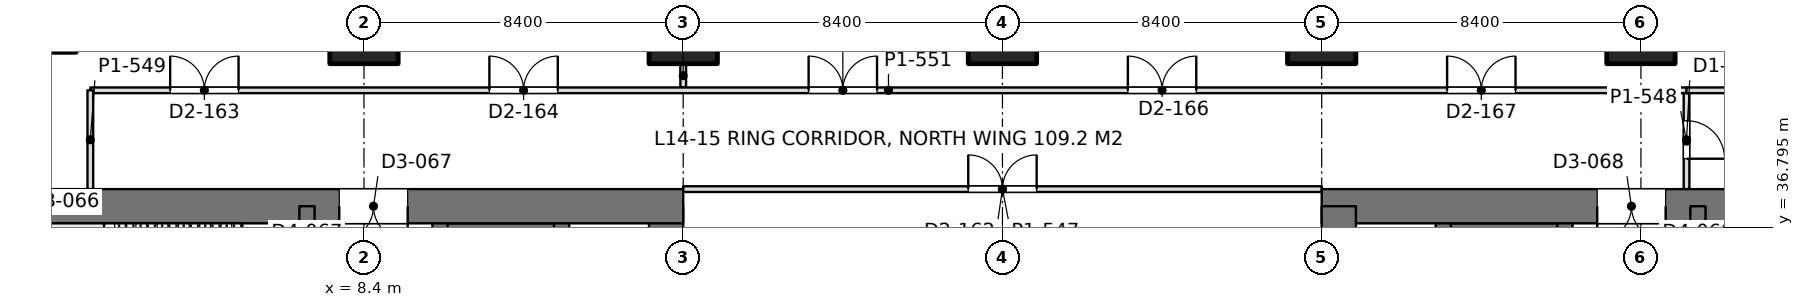
"""IFC4 building model, lengths in metres.
Left out: names, types, materials, properties, quantities, classifications, styles, units other than length and angle.
Written with IfcOpenShell. Run it as: python <this file> out.ifc"""

import sys

from ifc_helpers import new_model, si_unit, direction, frame, frame_2d, origin, origin_2d, place, context, subcontext, project, spatial, rectangle, extrude, element, fill, save


model = new_model("IFC4")
c1 = context("Model", 3, precision=1e-05, world=origin(), true_north=direction((0.0, 1.0)))
c2 = subcontext(c1, "Body", "Model", "MODEL_VIEW")
j1 = project(units=[si_unit("LENGTHUNIT", "METRE"), si_unit("PLANEANGLEUNIT", "RADIAN")], contexts=[c1])
p1 = place(None, origin())
s1 = spatial("IfcSite", under=j1, at=p1, CompositionType="ELEMENT")
p2 = place(p1, origin())
s2 = spatial("IfcBuilding", under=s1, at=p2, CompositionType="ELEMENT")
p3 = place(p2, frame((0.0, 0.0, 63.9)))
s3 = spatial("IfcBuildingStorey", under=s2, at=p3, CompositionType="ELEMENT", Elevation=63.9)
for number, where, z_axis, x_axis in (
    (1, (8.4, 42.0, 0.0), (0.0, 0.0, 1.0), (1.0, 0.0, 0.0)),
    (2, (16.8, 42.0, 0.0), (0.0, 0.0, 1.0), (1.0, 0.0, 0.0)),
    (3, (25.2, 42.0, 0.0), (0.0, 0.0, 1.0), (1.0, 0.0, 0.0)),
    (4, (33.6, 42.0, 0.0), (0.0, 0.0, 1.0), (1.0, 0.0, 0.0)),
    (5, (42.0, 42.0, 0.0), (0.0, 0.0, 1.0), (1.0, 0.0, 0.0)),
):
    element("IfcColumn", number, at=place(p3, frame(where, z_axis=z_axis, x_axis=x_axis)), inside=s3, PredefinedType="COLUMN", context=c2, shape_type="SweptSolid", body=[
        extrude(rectangle(XDim=1.8, YDim=1.8, at=origin_2d()), origin(), (0.0, 0.0, 1.0), 4.5),
    ])
p4 = place(p3, frame((-1.2, 37.35, 0.0), z_axis=(0.0, 0.0, 1.0), x_axis=(1.0, 0.0, 0.0)))
e6 = element("IfcWall", 6, at=p4, inside=s3, PredefinedType="SHEAR", context=c2, shape_type="SweptSolid", body=[
    extrude(rectangle(XDim=18.0, YDim=0.9, at=frame_2d((9.0, 0.0))), origin(), (0.0, 0.0, 1.0), 4.5),
])
p5 = place(p4, frame((8.95, 0.0, 0.0)))
e7 = element("IfcOpeningElement", 7, at=p5, cuts=e6, PredefinedType="OPENING", context=c2, shape_type="SweptSolid", body=[
    extrude(rectangle(XDim=1.8, YDim=2.4, at=frame_2d((0.9, 1.2))), frame((0.0, 0.46, 0.0), z_axis=(0.0, -1.0, 0.0), x_axis=(1.0, 0.0, 0.0)), (0.0, 0.0, 1.0), 0.92),
])
p6 = place(p3, frame((16.35, 13.05, 0.0), z_axis=(0.0, 0.0, 1.0), x_axis=(0.0, 1.0, 0.0)))
e8 = element("IfcWall", 8, at=p6, inside=s3, PredefinedType="SHEAR", context=c2, shape_type="SweptSolid", body=[
    extrude(rectangle(XDim=24.3, YDim=0.9, at=frame_2d((12.15, 0.0))), origin(), (0.0, 0.0, 1.0), 4.5),
])
p7 = place(p3, frame((6.9, 13.05, 0.0), z_axis=(0.0, 0.0, 1.0), x_axis=(0.0, 1.0, 0.0)))
e9 = element("IfcWall", 9, at=p7, inside=s3, PredefinedType="SHEAR", context=c2, shape_type="SweptSolid", body=[
    extrude(rectangle(XDim=24.3, YDim=0.4, at=frame_2d((12.15, 0.0))), origin(), (0.0, 0.0, 1.0), 4.5),
])
p8 = place(p7, frame((1.3, 0.0, 0.0)))
e10 = element("IfcOpeningElement", 10, at=p8, cuts=e9, PredefinedType="OPENING", context=c2, shape_type="SweptSolid", body=[
    extrude(rectangle(XDim=1.0, YDim=2.2, at=frame_2d((0.5, 1.1))), frame((0.0, 0.21, 0.0), z_axis=(0.0, -1.0, 0.0), x_axis=(1.0, 0.0, 0.0)), (0.0, 0.0, 1.0), 0.42),
])
p9 = place(p7, frame((22.0, 0.0, 0.0)))
e11 = element("IfcOpeningElement", 11, at=p9, cuts=e9, PredefinedType="OPENING", context=c2, shape_type="SweptSolid", body=[
    extrude(rectangle(XDim=1.0, YDim=2.2, at=frame_2d((0.5, 1.1))), frame((0.0, 0.21, 0.0), z_axis=(0.0, -1.0, 0.0), x_axis=(1.0, 0.0, 0.0)), (0.0, 0.0, 1.0), 0.42),
])
p10 = place(p7, frame((5.55, 0.0, 0.0)))
e12 = element("IfcOpeningElement", 12, at=p10, cuts=e9, PredefinedType="OPENING", context=c2, shape_type="SweptSolid", body=[
    extrude(rectangle(XDim=1.0, YDim=2.2, at=frame_2d((0.5, 1.1))), frame((0.0, 0.21, 0.0), z_axis=(0.0, -1.0, 0.0), x_axis=(1.0, 0.0, 0.0)), (0.0, 0.0, 1.0), 0.42),
])
p11 = place(p7, frame((9.55, 0.0, 0.0)))
e13 = element("IfcOpeningElement", 13, at=p11, cuts=e9, PredefinedType="OPENING", context=c2, shape_type="SweptSolid", body=[
    extrude(rectangle(XDim=1.0, YDim=2.2, at=frame_2d((0.5, 1.1))), frame((0.0, 0.21, 0.0), z_axis=(0.0, -1.0, 0.0), x_axis=(1.0, 0.0, 0.0)), (0.0, 0.0, 1.0), 0.42),
])
p12 = place(p7, frame((12.8, 0.0, 0.0)))
e14 = element("IfcOpeningElement", 14, at=p12, cuts=e9, PredefinedType="OPENING", context=c2, shape_type="SweptSolid", body=[
    extrude(rectangle(XDim=1.1, YDim=2.2, at=frame_2d((0.55, 1.1))), frame((0.0, 0.21, 0.0), z_axis=(0.0, -1.0, 0.0), x_axis=(1.0, 0.0, 0.0)), (0.0, 0.0, 1.0), 0.42),
])
p13 = place(p7, frame((15.538, 0.0, 0.0)))
e15 = element("IfcOpeningElement", 15, at=p13, cuts=e9, PredefinedType="OPENING", context=c2, shape_type="SweptSolid", body=[
    extrude(rectangle(XDim=1.1, YDim=2.2, at=frame_2d((0.55, 1.1))), frame((0.0, 0.21, 0.0), z_axis=(0.0, -1.0, 0.0), x_axis=(1.0, 0.0, 0.0)), (0.0, 0.0, 1.0), 0.42),
])
p14 = place(p7, frame((18.262, 0.0, 0.0)))
e16 = element("IfcOpeningElement", 16, at=p14, cuts=e9, PredefinedType="OPENING", context=c2, shape_type="SweptSolid", body=[
    extrude(rectangle(XDim=1.1, YDim=2.2, at=frame_2d((0.55, 1.1))), frame((0.0, 0.21, 0.0), z_axis=(0.0, -1.0, 0.0), x_axis=(1.0, 0.0, 0.0)), (0.0, 0.0, 1.0), 0.42),
])
p15 = place(p3, frame((10.4, 13.05, 0.0), z_axis=(0.0, 0.0, 1.0), x_axis=(0.0, 1.0, 0.0)))
e17 = element("IfcWall", 17, at=p15, inside=s3, PredefinedType="SHEAR", context=c2, shape_type="SweptSolid", body=[
    extrude(rectangle(XDim=24.3, YDim=0.4, at=frame_2d((12.15, 0.0))), origin(), (0.0, 0.0, 1.0), 4.5),
])
p16 = place(p15, frame((1.5, 0.0, 0.0)))
e18 = element("IfcOpeningElement", 18, at=p16, cuts=e17, PredefinedType="OPENING", context=c2, shape_type="SweptSolid", body=[
    extrude(rectangle(XDim=1.1, YDim=2.2, at=frame_2d((0.55, 1.1))), frame((0.0, 0.21, 0.0), z_axis=(0.0, -1.0, 0.0), x_axis=(1.0, 0.0, 0.0)), (0.0, 0.0, 1.0), 0.42),
])
p17 = place(p15, frame((4.35, 0.0, 0.0)))
e19 = element("IfcOpeningElement", 19, at=p17, cuts=e17, PredefinedType="OPENING", context=c2, shape_type="SweptSolid", body=[
    extrude(rectangle(XDim=1.1, YDim=2.2, at=frame_2d((0.55, 1.1))), frame((0.0, 0.21, 0.0), z_axis=(0.0, -1.0, 0.0), x_axis=(1.0, 0.0, 0.0)), (0.0, 0.0, 1.0), 0.42),
])
p18 = place(p15, frame((7.2, 0.0, 0.0)))
e20 = element("IfcOpeningElement", 20, at=p18, cuts=e17, PredefinedType="OPENING", context=c2, shape_type="SweptSolid", body=[
    extrude(rectangle(XDim=1.1, YDim=2.2, at=frame_2d((0.55, 1.1))), frame((0.0, 0.21, 0.0), z_axis=(0.0, -1.0, 0.0), x_axis=(1.0, 0.0, 0.0)), (0.0, 0.0, 1.0), 0.42),
])
p19 = place(p15, frame((21.45, 0.0, 0.0)))
e21 = element("IfcOpeningElement", 21, at=p19, cuts=e17, PredefinedType="OPENING", context=c2, shape_type="SweptSolid", body=[
    extrude(rectangle(XDim=1.1, YDim=2.2, at=frame_2d((0.55, 1.1))), frame((0.0, 0.21, 0.0), z_axis=(0.0, -1.0, 0.0), x_axis=(1.0, 0.0, 0.0)), (0.0, 0.0, 1.0), 0.42),
])
p20 = place(p3, frame((13.6, 13.05, 0.0), z_axis=(0.0, 0.0, 1.0), x_axis=(0.0, 1.0, 0.0)))
e22 = element("IfcWall", 22, at=p20, inside=s3, PredefinedType="SHEAR", context=c2, shape_type="SweptSolid", body=[
    extrude(rectangle(XDim=24.3, YDim=0.4, at=frame_2d((12.15, 0.0))), origin(), (0.0, 0.0, 1.0), 4.5),
])
p21 = place(p3, frame((10.4, 36.625, 0.0), z_axis=(0.0, 0.0, 1.0), x_axis=(1.0, 0.0, 0.0)))
e23 = element("IfcWall", 23, at=p21, inside=s3, PredefinedType="SHEAR", context=c2, shape_type="SweptSolid", body=[
    extrude(rectangle(XDim=3.2, YDim=0.55, at=frame_2d((1.6, 0.0))), origin(), (0.0, 0.0, 1.0), 4.5),
])
p22 = place(p3, frame((33.6, 37.35, 0.0), z_axis=(0.0, 0.0, 1.0), x_axis=(1.0, 0.0, 0.0)))
e24 = element("IfcWall", 24, at=p22, inside=s3, PredefinedType="SHEAR", context=c2, shape_type="SweptSolid", body=[
    extrude(rectangle(XDim=18.0, YDim=0.9, at=frame_2d((9.0, 0.0))), origin(), (0.0, 0.0, 1.0), 4.5),
])
p23 = place(p22, frame((7.25, 0.0, 0.0)))
e25 = element("IfcOpeningElement", 25, at=p23, cuts=e24, PredefinedType="OPENING", context=c2, shape_type="SweptSolid", body=[
    extrude(rectangle(XDim=1.8, YDim=2.4, at=frame_2d((0.9, 1.2))), frame((0.0, 0.46, 0.0), z_axis=(0.0, -1.0, 0.0), x_axis=(1.0, 0.0, 0.0)), (0.0, 0.0, 1.0), 0.92),
])
p24 = place(p3, frame((34.05, 13.05, 0.0), z_axis=(0.0, 0.0, 1.0), x_axis=(0.0, 1.0, 0.0)))
e26 = element("IfcWall", 26, at=p24, inside=s3, PredefinedType="SHEAR", context=c2, shape_type="SweptSolid", body=[
    extrude(rectangle(XDim=24.3, YDim=0.9, at=frame_2d((12.15, 0.0))), origin(), (0.0, 0.0, 1.0), 4.5),
])
p25 = place(p3, frame((43.5, 13.05, 0.0), z_axis=(0.0, 0.0, 1.0), x_axis=(0.0, 1.0, 0.0)))
e27 = element("IfcWall", 27, at=p25, inside=s3, PredefinedType="SHEAR", context=c2, shape_type="SweptSolid", body=[
    extrude(rectangle(XDim=24.3, YDim=0.4, at=frame_2d((12.15, 0.0))), origin(), (0.0, 0.0, 1.0), 4.5),
])
p26 = place(p25, frame((1.3, 0.0, 0.0)))
e28 = element("IfcOpeningElement", 28, at=p26, cuts=e27, PredefinedType="OPENING", context=c2, shape_type="SweptSolid", body=[
    extrude(rectangle(XDim=1.0, YDim=2.2, at=frame_2d((0.5, 1.1))), frame((0.0, 0.21, 0.0), z_axis=(0.0, -1.0, 0.0), x_axis=(1.0, 0.0, 0.0)), (0.0, 0.0, 1.0), 0.42),
])
p27 = place(p25, frame((22.0, 0.0, 0.0)))
e29 = element("IfcOpeningElement", 29, at=p27, cuts=e27, PredefinedType="OPENING", context=c2, shape_type="SweptSolid", body=[
    extrude(rectangle(XDim=1.0, YDim=2.2, at=frame_2d((0.5, 1.1))), frame((0.0, 0.21, 0.0), z_axis=(0.0, -1.0, 0.0), x_axis=(1.0, 0.0, 0.0)), (0.0, 0.0, 1.0), 0.42),
])
p28 = place(p25, frame((5.55, 0.0, 0.0)))
e30 = element("IfcOpeningElement", 30, at=p28, cuts=e27, PredefinedType="OPENING", context=c2, shape_type="SweptSolid", body=[
    extrude(rectangle(XDim=1.0, YDim=2.2, at=frame_2d((0.5, 1.1))), frame((0.0, 0.21, 0.0), z_axis=(0.0, -1.0, 0.0), x_axis=(1.0, 0.0, 0.0)), (0.0, 0.0, 1.0), 0.42),
])
p29 = place(p25, frame((9.55, 0.0, 0.0)))
e31 = element("IfcOpeningElement", 31, at=p29, cuts=e27, PredefinedType="OPENING", context=c2, shape_type="SweptSolid", body=[
    extrude(rectangle(XDim=1.0, YDim=2.2, at=frame_2d((0.5, 1.1))), frame((0.0, 0.21, 0.0), z_axis=(0.0, -1.0, 0.0), x_axis=(1.0, 0.0, 0.0)), (0.0, 0.0, 1.0), 0.42),
])
p30 = place(p25, frame((12.8, 0.0, 0.0)))
e32 = element("IfcOpeningElement", 32, at=p30, cuts=e27, PredefinedType="OPENING", context=c2, shape_type="SweptSolid", body=[
    extrude(rectangle(XDim=1.1, YDim=2.2, at=frame_2d((0.55, 1.1))), frame((0.0, 0.21, 0.0), z_axis=(0.0, -1.0, 0.0), x_axis=(1.0, 0.0, 0.0)), (0.0, 0.0, 1.0), 0.42),
])
p31 = place(p25, frame((15.538, 0.0, 0.0)))
e33 = element("IfcOpeningElement", 33, at=p31, cuts=e27, PredefinedType="OPENING", context=c2, shape_type="SweptSolid", body=[
    extrude(rectangle(XDim=1.1, YDim=2.2, at=frame_2d((0.55, 1.1))), frame((0.0, 0.21, 0.0), z_axis=(0.0, -1.0, 0.0), x_axis=(1.0, 0.0, 0.0)), (0.0, 0.0, 1.0), 0.42),
])
p32 = place(p25, frame((18.262, 0.0, 0.0)))
e34 = element("IfcOpeningElement", 34, at=p32, cuts=e27, PredefinedType="OPENING", context=c2, shape_type="SweptSolid", body=[
    extrude(rectangle(XDim=1.1, YDim=2.2, at=frame_2d((0.55, 1.1))), frame((0.0, 0.21, 0.0), z_axis=(0.0, -1.0, 0.0), x_axis=(1.0, 0.0, 0.0)), (0.0, 0.0, 1.0), 0.42),
])
p33 = place(p3, frame((40.0, 13.05, 0.0), z_axis=(0.0, 0.0, 1.0), x_axis=(0.0, 1.0, 0.0)))
e35 = element("IfcWall", 35, at=p33, inside=s3, PredefinedType="SHEAR", context=c2, shape_type="SweptSolid", body=[
    extrude(rectangle(XDim=24.3, YDim=0.4, at=frame_2d((12.15, 0.0))), origin(), (0.0, 0.0, 1.0), 4.5),
])
p34 = place(p33, frame((1.5, 0.0, 0.0)))
e36 = element("IfcOpeningElement", 36, at=p34, cuts=e35, PredefinedType="OPENING", context=c2, shape_type="SweptSolid", body=[
    extrude(rectangle(XDim=1.1, YDim=2.2, at=frame_2d((0.55, 1.1))), frame((0.0, 0.21, 0.0), z_axis=(0.0, -1.0, 0.0), x_axis=(1.0, 0.0, 0.0)), (0.0, 0.0, 1.0), 0.42),
])
p35 = place(p33, frame((4.35, 0.0, 0.0)))
e37 = element("IfcOpeningElement", 37, at=p35, cuts=e35, PredefinedType="OPENING", context=c2, shape_type="SweptSolid", body=[
    extrude(rectangle(XDim=1.1, YDim=2.2, at=frame_2d((0.55, 1.1))), frame((0.0, 0.21, 0.0), z_axis=(0.0, -1.0, 0.0), x_axis=(1.0, 0.0, 0.0)), (0.0, 0.0, 1.0), 0.42),
])
p36 = place(p33, frame((7.2, 0.0, 0.0)))
e38 = element("IfcOpeningElement", 38, at=p36, cuts=e35, PredefinedType="OPENING", context=c2, shape_type="SweptSolid", body=[
    extrude(rectangle(XDim=1.1, YDim=2.2, at=frame_2d((0.55, 1.1))), frame((0.0, 0.21, 0.0), z_axis=(0.0, -1.0, 0.0), x_axis=(1.0, 0.0, 0.0)), (0.0, 0.0, 1.0), 0.42),
])
p37 = place(p33, frame((21.45, 0.0, 0.0)))
e39 = element("IfcOpeningElement", 39, at=p37, cuts=e35, PredefinedType="OPENING", context=c2, shape_type="SweptSolid", body=[
    extrude(rectangle(XDim=1.1, YDim=2.2, at=frame_2d((0.55, 1.1))), frame((0.0, 0.21, 0.0), z_axis=(0.0, -1.0, 0.0), x_axis=(1.0, 0.0, 0.0)), (0.0, 0.0, 1.0), 0.42),
])
p38 = place(p3, frame((36.8, 13.05, 0.0), z_axis=(0.0, 0.0, 1.0), x_axis=(0.0, 1.0, 0.0)))
e40 = element("IfcWall", 40, at=p38, inside=s3, PredefinedType="SHEAR", context=c2, shape_type="SweptSolid", body=[
    extrude(rectangle(XDim=24.3, YDim=0.4, at=frame_2d((12.15, 0.0))), origin(), (0.0, 0.0, 1.0), 4.5),
])
p39 = place(p3, frame((40.0, 36.625, 0.0), z_axis=(0.0, 0.0, 1.0), x_axis=(-1.0, 0.0, 0.0)))
e41 = element("IfcWall", 41, at=p39, inside=s3, PredefinedType="SHEAR", context=c2, shape_type="SweptSolid", body=[
    extrude(rectangle(XDim=3.2, YDim=0.55, at=frame_2d((1.6, 0.0))), origin(), (0.0, 0.0, 1.0), 4.5),
])
p40 = place(p3, frame((16.8, 40.474, 0.0), z_axis=(0.0, 0.0, 1.0), x_axis=(0.0, 1.0, 0.0)))
e42 = element("IfcWall", 42, at=p40, inside=s3, PredefinedType="PARTITIONING", context=c2, shape_type="SweptSolid", body=[
    extrude(rectangle(XDim=0.627, YDim=0.15, at=frame_2d((0.313, 0.0))), origin(), (0.0, 0.0, 1.0), 3.98),
])
p41 = place(p3, frame((1.2, 40.4, 0.0), z_axis=(0.0, 0.0, 1.0), x_axis=(1.0, 0.0, 0.0)))
e43 = element("IfcWall", 43, at=p41, inside=s3, PredefinedType="PARTITIONING", context=c2, shape_type="SweptSolid", body=[
    extrude(rectangle(XDim=42.002, YDim=0.15, at=frame_2d((21.001, 0.0))), origin(), (0.0, 0.0, 1.0), 3.74),
])
p42 = place(p41, frame((2.1, 0.0, 0.0)))
e44 = element("IfcOpeningElement", 44, at=p42, cuts=e43, PredefinedType="OPENING", context=c2, shape_type="SweptSolid", body=[
    extrude(rectangle(XDim=1.8, YDim=2.2, at=frame_2d((0.9, 1.1))), frame((0.0, 0.085, 0.0), z_axis=(0.0, -1.0, 0.0), x_axis=(1.0, 0.0, 0.0)), (0.0, 0.0, 1.0), 0.17),
])
p43 = place(p41, frame((10.5, 0.0, 0.0)))
e45 = element("IfcOpeningElement", 45, at=p43, cuts=e43, PredefinedType="OPENING", context=c2, shape_type="SweptSolid", body=[
    extrude(rectangle(XDim=1.8, YDim=2.2, at=frame_2d((0.9, 1.1))), frame((0.0, 0.085, 0.0), z_axis=(0.0, -1.0, 0.0), x_axis=(1.0, 0.0, 0.0)), (0.0, 0.0, 1.0), 0.17),
])
p44 = place(p41, frame((18.9, 0.0, 0.0)))
e46 = element("IfcOpeningElement", 46, at=p44, cuts=e43, PredefinedType="OPENING", context=c2, shape_type="SweptSolid", body=[
    extrude(rectangle(XDim=1.8, YDim=2.2, at=frame_2d((0.9, 1.1))), frame((0.0, 0.085, 0.0), z_axis=(0.0, -1.0, 0.0), x_axis=(1.0, 0.0, 0.0)), (0.0, 0.0, 1.0), 0.17),
])
p45 = place(p41, frame((27.3, 0.0, 0.0)))
e47 = element("IfcOpeningElement", 47, at=p45, cuts=e43, PredefinedType="OPENING", context=c2, shape_type="SweptSolid", body=[
    extrude(rectangle(XDim=1.8, YDim=2.2, at=frame_2d((0.9, 1.1))), frame((0.0, 0.085, 0.0), z_axis=(0.0, -1.0, 0.0), x_axis=(1.0, 0.0, 0.0)), (0.0, 0.0, 1.0), 0.17),
])
p46 = place(p41, frame((35.7, 0.0, 0.0)))
e48 = element("IfcOpeningElement", 48, at=p46, cuts=e43, PredefinedType="OPENING", context=c2, shape_type="SweptSolid", body=[
    extrude(rectangle(XDim=1.8, YDim=2.2, at=frame_2d((0.9, 1.1))), frame((0.0, 0.085, 0.0), z_axis=(0.0, -1.0, 0.0), x_axis=(1.0, 0.0, 0.0)), (0.0, 0.0, 1.0), 0.17),
])
p47 = place(p3, frame((1.2, 37.8, 0.0), z_axis=(0.0, 0.0, 1.0), x_axis=(0.0, 1.0, 0.0)))
e49 = element("IfcWall", 49, at=p47, inside=s3, PredefinedType="PARTITIONING", context=c2, shape_type="SweptSolid", body=[
    extrude(rectangle(XDim=2.6, YDim=0.15, at=frame_2d((1.3, 0.0))), origin(), (0.0, 0.0, 1.0), 4.34),
])
p48 = place(p3, frame((43.2, 37.8, 0.0), z_axis=(0.0, 0.0, 1.0), x_axis=(0.0, 1.0, 0.0)))
e50 = element("IfcWall", 50, at=p48, inside=s3, PredefinedType="PARTITIONING", context=c2, shape_type="SweptSolid", body=[
    extrude(rectangle(XDim=2.526, YDim=0.15, at=frame_2d((1.263, 0.0))), origin(), (0.0, 0.0, 1.0), 4.34),
])
p49 = place(p48, frame((0.8, 0.0, 0.0)))
e51 = element("IfcOpeningElement", 51, at=p49, cuts=e50, PredefinedType="OPENING", context=c2, shape_type="SweptSolid", body=[
    extrude(rectangle(XDim=1.0, YDim=2.2, at=frame_2d((0.5, 1.1))), frame((0.0, 0.085, 0.0), z_axis=(0.0, -1.0, 0.0), x_axis=(1.0, 0.0, 0.0)), (0.0, 0.0, 1.0), 0.17),
])
p50 = place(p3, frame((43.198, 40.4, 0.0), z_axis=(0.0, 0.0, 1.0), x_axis=(1.0, 0.0, 0.0)))
e52 = element("IfcWall", 52, at=p50, inside=s3, PredefinedType="PARTITIONING", context=c2, shape_type="SweptSolid", body=[
    extrude(rectangle(XDim=6.002, YDim=0.15, at=frame_2d((3.001, 0.0))), origin(), (0.0, 0.0, 1.0), 3.98),
])
p51 = place(p3, frame((16.798, 37.8, 0.0), z_axis=(0.0, 0.0, 1.0), x_axis=(1.0, 0.0, 0.0)))
e53 = element("IfcWall", 53, at=p51, inside=s3, PredefinedType="PARTITIONING", context=c2, shape_type="SweptSolid", body=[
    extrude(rectangle(XDim=16.804, YDim=0.15, at=frame_2d((8.402, 0.0))), origin(), (0.0, 0.0, 1.0), 3.74),
])
p52 = place(p51, frame((7.502, 0.0, 0.0)))
e54 = element("IfcOpeningElement", 54, at=p52, cuts=e53, PredefinedType="OPENING", context=c2, shape_type="SweptSolid", body=[
    extrude(rectangle(XDim=1.8, YDim=2.2, at=frame_2d((0.9, 1.1))), frame((0.0, 0.085, 0.0), z_axis=(0.0, -1.0, 0.0), x_axis=(1.0, 0.0, 0.0)), (0.0, 0.0, 1.0), 0.17),
])
p53 = place(p5, frame((1.8, 0.0, 0.0), z_axis=(0.0, 0.0, 1.0), x_axis=(-1.0, 0.0, 0.0)))
e55 = element("IfcDoor", 55, at=p53, inside=s3, OperationType="DOUBLE_DOOR_SINGLE_SWING", PredefinedType="DOOR", context=c2, shape_type="SweptSolid", body=[
    extrude(rectangle(XDim=1.8, YDim=2.4, at=frame_2d((0.9, 1.2))), frame((0.0, 0.025, 0.0), z_axis=(0.0, -1.0, 0.0), x_axis=(1.0, 0.0, 0.0)), (0.0, 0.0, 1.0), 0.05),
])
fill(e7, e55)
p54 = place(p23, frame((1.8, 0.0, 0.0), z_axis=(0.0, 0.0, 1.0), x_axis=(-1.0, 0.0, 0.0)))
e56 = element("IfcDoor", 56, at=p54, inside=s3, OperationType="DOUBLE_DOOR_SINGLE_SWING", PredefinedType="DOOR", context=c2, shape_type="SweptSolid", body=[
    extrude(rectangle(XDim=1.8, YDim=2.4, at=frame_2d((0.9, 1.2))), frame((0.0, 0.025, 0.0), z_axis=(0.0, -1.0, 0.0), x_axis=(1.0, 0.0, 0.0)), (0.0, 0.0, 1.0), 0.05),
])
fill(e25, e56)
p55 = place(p42, origin())
e57 = element("IfcDoor", 57, at=p55, inside=s3, OperationType="DOUBLE_DOOR_SINGLE_SWING", PredefinedType="DOOR", context=c2, shape_type="SweptSolid", body=[
    extrude(rectangle(XDim=1.8, YDim=2.2, at=frame_2d((0.9, 1.1))), frame((0.0, 0.025, 0.0), z_axis=(0.0, -1.0, 0.0), x_axis=(1.0, 0.0, 0.0)), (0.0, 0.0, 1.0), 0.05),
])
fill(e44, e57)
p56 = place(p43, origin())
e58 = element("IfcDoor", 58, at=p56, inside=s3, OperationType="DOUBLE_DOOR_SINGLE_SWING", PredefinedType="DOOR", context=c2, shape_type="SweptSolid", body=[
    extrude(rectangle(XDim=1.8, YDim=2.2, at=frame_2d((0.9, 1.1))), frame((0.0, 0.025, 0.0), z_axis=(0.0, -1.0, 0.0), x_axis=(1.0, 0.0, 0.0)), (0.0, 0.0, 1.0), 0.05),
])
fill(e45, e58)
p57 = place(p44, origin())
e59 = element("IfcDoor", 59, at=p57, inside=s3, OperationType="DOUBLE_DOOR_SINGLE_SWING", PredefinedType="DOOR", context=c2, shape_type="SweptSolid", body=[
    extrude(rectangle(XDim=1.8, YDim=2.2, at=frame_2d((0.9, 1.1))), frame((0.0, 0.025, 0.0), z_axis=(0.0, -1.0, 0.0), x_axis=(1.0, 0.0, 0.0)), (0.0, 0.0, 1.0), 0.05),
])
fill(e46, e59)
p58 = place(p45, origin())
e60 = element("IfcDoor", 60, at=p58, inside=s3, OperationType="DOUBLE_DOOR_SINGLE_SWING", PredefinedType="DOOR", context=c2, shape_type="SweptSolid", body=[
    extrude(rectangle(XDim=1.8, YDim=2.2, at=frame_2d((0.9, 1.1))), frame((0.0, 0.025, 0.0), z_axis=(0.0, -1.0, 0.0), x_axis=(1.0, 0.0, 0.0)), (0.0, 0.0, 1.0), 0.05),
])
fill(e47, e60)
p59 = place(p46, origin())
e61 = element("IfcDoor", 61, at=p59, inside=s3, OperationType="DOUBLE_DOOR_SINGLE_SWING", PredefinedType="DOOR", context=c2, shape_type="SweptSolid", body=[
    extrude(rectangle(XDim=1.8, YDim=2.2, at=frame_2d((0.9, 1.1))), frame((0.0, 0.025, 0.0), z_axis=(0.0, -1.0, 0.0), x_axis=(1.0, 0.0, 0.0)), (0.0, 0.0, 1.0), 0.05),
])
fill(e48, e61)
p60 = place(p49, frame((1.0, 0.0, 0.0), z_axis=(0.0, 0.0, 1.0), x_axis=(-1.0, 0.0, 0.0)))
e62 = element("IfcDoor", 62, at=p60, inside=s3, OperationType="SINGLE_SWING_RIGHT", PredefinedType="DOOR", context=c2, shape_type="SweptSolid", body=[
    extrude(rectangle(XDim=1.0, YDim=2.2, at=frame_2d((0.5, 1.1))), frame((0.0, 0.025, 0.0), z_axis=(0.0, -1.0, 0.0), x_axis=(1.0, 0.0, 0.0)), (0.0, 0.0, 1.0), 0.05),
])
fill(e51, e62)
p61 = place(p52, origin())
e63 = element("IfcDoor", 63, at=p61, inside=s3, OperationType="DOUBLE_DOOR_SINGLE_SWING", PredefinedType="DOOR", context=c2, shape_type="SweptSolid", body=[
    extrude(rectangle(XDim=1.8, YDim=2.2, at=frame_2d((0.9, 1.1))), frame((0.0, 0.025, 0.0), z_axis=(0.0, -1.0, 0.0), x_axis=(1.0, 0.0, 0.0)), (0.0, 0.0, 1.0), 0.05),
])
fill(e54, e63)
save(model, sys.argv[1])
